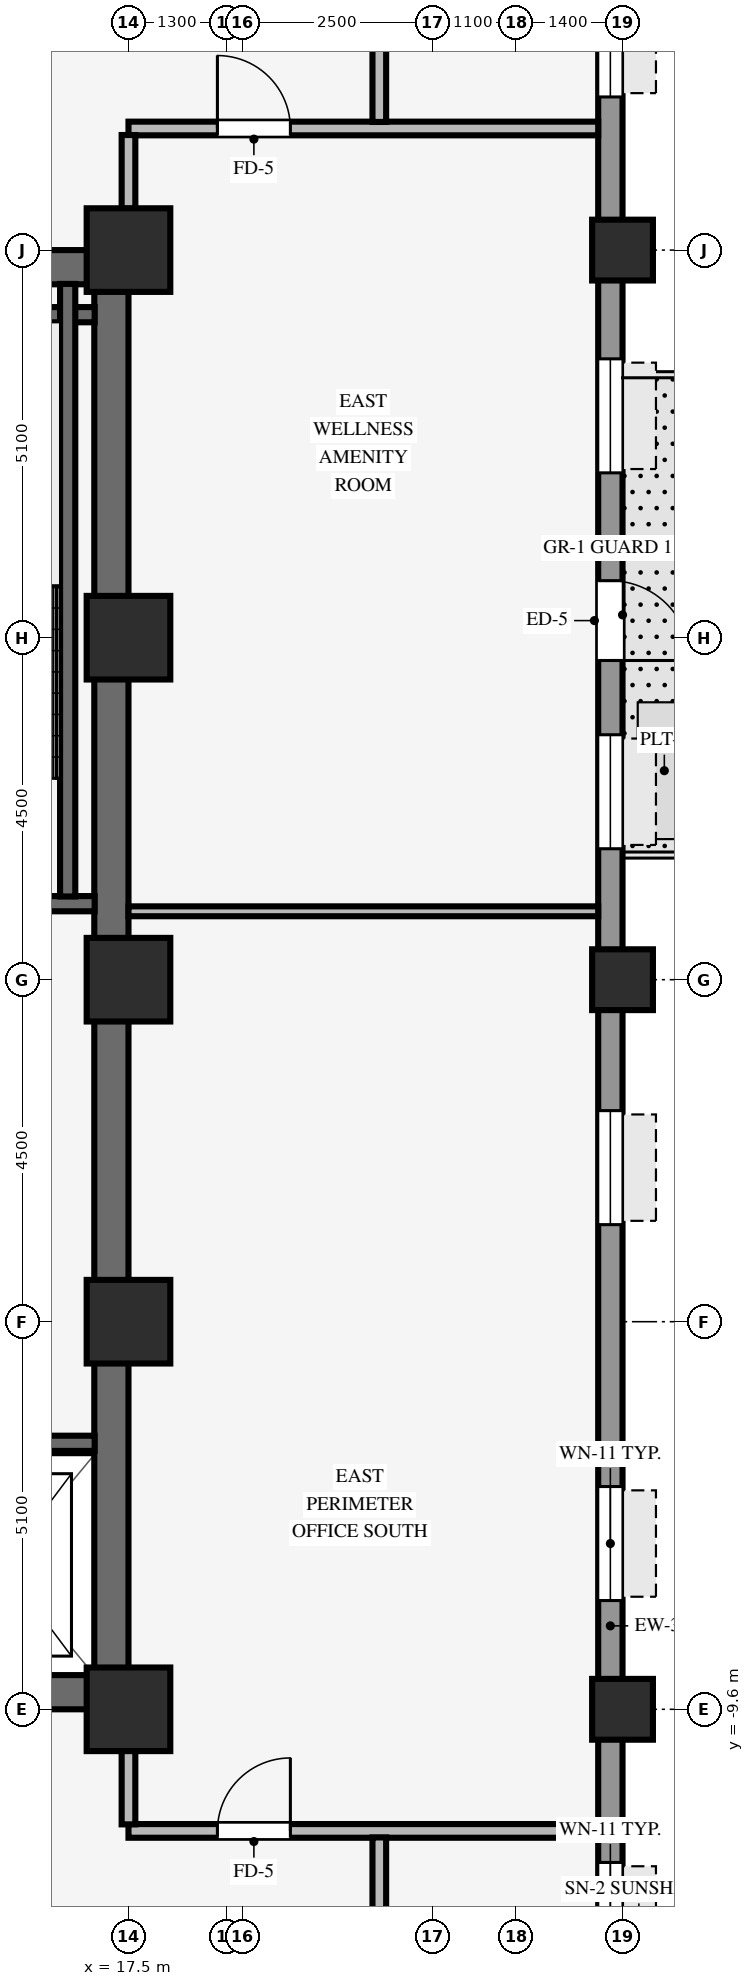
"""IFC4 building model, lengths in metres.
Left out: names, types, materials, properties, quantities, classifications, styles, units other than length and angle.
Written with IfcOpenShell. Run it as: python <this file> out.ifc"""

import sys

from ifc_helpers import new_model, si_unit, direction, frame, frame_2d, origin, origin_2d, place, context, subcontext, project, spatial, rectangle, hollow_rectangle, extrude, source, transform, mapped, element, fill, save


model = new_model("IFC4")
c1 = context("Model", 3, precision=1e-05, world=origin(), true_north=direction((0.0, 1.0)))
c2 = subcontext(c1, "Body", "Model", "MODEL_VIEW")
j1 = project(units=[si_unit("LENGTHUNIT", "METRE"), si_unit("PLANEANGLEUNIT", "RADIAN")], contexts=[c1])
p1 = place(None, origin())
s1 = spatial("IfcSite", under=j1, at=p1, CompositionType="ELEMENT")
p2 = place(p1, origin())
s2 = spatial("IfcBuilding", under=s1, at=p2, CompositionType="ELEMENT")
p3 = place(p2, frame((0.0, 0.0, 86.0)))
s3 = spatial("IfcBuildingStorey", under=s2, at=p3, CompositionType="ELEMENT", Elevation=86.0)
for number, where, z_axis, x_axis in (
    (1, (9.0, -9.375, 0.0), (0.0, 0.0, 1.0), (1.0, 0.0, 0.0)),
    (2, (9.0, 9.375, 0.0), (0.0, 0.0, 1.0), (1.0, 0.0, 0.0)),
):
    element("IfcWall", number, at=place(p3, frame(where, z_axis=z_axis, x_axis=x_axis)), inside=s3, PredefinedType="SHEAR", context=c2, shape_type="SweptSolid", body=[
        extrude(rectangle(XDim=8.5, YDim=0.45, at=frame_2d((4.25, 0.0))), origin(), (0.0, 0.0, 1.0), 3.37),
    ])
p4 = place(p3, frame((17.275, -9.155, 0.0), z_axis=(0.0, 0.0, 1.0), x_axis=(0.0, 1.0, 0.0)))
e3 = element("IfcWall", 3, at=p4, inside=s3, PredefinedType="SHEAR", context=c2, shape_type="SweptSolid", body=[
    extrude(rectangle(XDim=18.31, YDim=0.45, at=frame_2d((9.155, 0.0))), origin(), (0.0, 0.0, 1.0), 3.37),
])
for number, where, z_axis, x_axis in (
    (4, (17.5, -9.6, 0.0), (0.0, 0.0, 1.0), (1.0, 0.0, 0.0)),
    (5, (17.5, -4.5, 0.0), (0.0, 0.0, 1.0), (1.0, 0.0, 0.0)),
    (6, (17.5, 4.5, 0.0), (0.0, 0.0, 1.0), (1.0, 0.0, 0.0)),
    (7, (17.5, 9.6, 0.0), (0.0, 0.0, 1.0), (1.0, 0.0, 0.0)),
    (8, (17.5, 0.0, 0.0), (0.0, 0.0, 1.0), (1.0, 0.0, 0.0)),
):
    element("IfcColumn", number, at=place(p3, frame(where, z_axis=z_axis, x_axis=x_axis)), inside=s3, PredefinedType="COLUMN", context=c2, shape_type="SweptSolid", body=[
        extrude(rectangle(XDim=1.1, YDim=1.1, at=origin_2d()), origin(), (0.0, 0.0, 1.0), 3.37),
    ])
for number, where, z_axis, x_axis in (
    (9, (24.0, -9.6, -0.4), (0.0, 0.0, 1.0), (1.0, 0.0, 0.0)),
    (10, (24.0, 0.0, -0.4), (0.0, 0.0, 1.0), (1.0, 0.0, 0.0)),
    (11, (24.0, 9.6, -0.4), (0.0, 0.0, 1.0), (1.0, 0.0, 0.0)),
):
    element("IfcColumn", number, at=place(p3, frame(where, z_axis=z_axis, x_axis=x_axis)), inside=s3, PredefinedType="COLUMN", context=c2, shape_type="SweptSolid", body=[
        extrude(hollow_rectangle(XDim=0.8, YDim=0.8, WallThickness=0.055, InnerFilletRadius=0.055, OuterFilletRadius=0.11, at=origin_2d()), origin(), (0.0, 0.0, 1.0), 3.77),
    ])
p5 = place(p3, frame((23.84, -20.784, 0.0), z_axis=(0.0, 0.0, 1.0), x_axis=(0.0, 1.0, 0.0)))
e12 = element("IfcWall", 12, at=p5, inside=s3, PredefinedType="STANDARD", context=c2, shape_type="SweptSolid", body=[
    extrude(rectangle(XDim=41.568, YDim=0.32, at=frame_2d((20.784, 0.0))), origin(), (0.0, 0.0, 1.0), 2.705),
])
p6 = place(p5, frame((26.034, 0.0, 0.0), z_axis=(0.0, 0.0, 1.0), x_axis=(-1.0, 0.0, 0.0)))
e13 = element("IfcOpeningElement", 13, at=p6, cuts=e12, PredefinedType="OPENING", context=c2, shape_type="SweptSolid", body=[
    extrude(rectangle(XDim=1.05, YDim=2.1, at=frame_2d((0.525, 1.05))), frame((0.0, 0.17, 0.0), z_axis=(0.0, -1.0, 0.0), x_axis=(1.0, 0.0, 0.0)), (0.0, 0.0, 1.0), 0.34),
])
p7 = place(p5, frame((1.373, 0.0, 0.8)))
e14 = element("IfcOpeningElement", 14, at=p7, cuts=e12, PredefinedType="OPENING", context=c2, shape_type="SweptSolid", body=[
    extrude(rectangle(XDim=1.5, YDim=1.6, at=frame_2d((0.75, 0.8))), frame((0.0, 0.17, 0.0), z_axis=(0.0, -1.0, 0.0), x_axis=(1.0, 0.0, 0.0)), (0.0, 0.0, 1.0), 0.34),
])
p8 = place(p5, frame((7.669, 0.0, 0.8)))
e15 = element("IfcOpeningElement", 15, at=p8, cuts=e12, PredefinedType="OPENING", context=c2, shape_type="SweptSolid", body=[
    extrude(rectangle(XDim=1.5, YDim=1.6, at=frame_2d((0.75, 0.8))), frame((0.0, 0.17, 0.0), z_axis=(0.0, -1.0, 0.0), x_axis=(1.0, 0.0, 0.0)), (0.0, 0.0, 1.0), 0.34),
])
p9 = place(p5, frame((12.615, 0.0, 0.8)))
e16 = element("IfcOpeningElement", 16, at=p9, cuts=e12, PredefinedType="OPENING", context=c2, shape_type="SweptSolid", body=[
    extrude(rectangle(XDim=1.5, YDim=1.6, at=frame_2d((0.75, 0.8))), frame((0.0, 0.17, 0.0), z_axis=(0.0, -1.0, 0.0), x_axis=(1.0, 0.0, 0.0)), (0.0, 0.0, 1.0), 0.34),
])
p10 = place(p5, frame((17.561, 0.0, 0.8)))
e17 = element("IfcOpeningElement", 17, at=p10, cuts=e12, PredefinedType="OPENING", context=c2, shape_type="SweptSolid", body=[
    extrude(rectangle(XDim=1.5, YDim=1.6, at=frame_2d((0.75, 0.8))), frame((0.0, 0.17, 0.0), z_axis=(0.0, -1.0, 0.0), x_axis=(1.0, 0.0, 0.0)), (0.0, 0.0, 1.0), 0.34),
])
p11 = place(p5, frame((22.507, 0.0, 0.8)))
e18 = element("IfcOpeningElement", 18, at=p11, cuts=e12, PredefinedType="OPENING", context=c2, shape_type="SweptSolid", body=[
    extrude(rectangle(XDim=1.5, YDim=1.6, at=frame_2d((0.75, 0.8))), frame((0.0, 0.17, 0.0), z_axis=(0.0, -1.0, 0.0), x_axis=(1.0, 0.0, 0.0)), (0.0, 0.0, 1.0), 0.34),
])
p12 = place(p5, frame((27.453, 0.0, 0.8)))
e19 = element("IfcOpeningElement", 19, at=p12, cuts=e12, PredefinedType="OPENING", context=c2, shape_type="SweptSolid", body=[
    extrude(rectangle(XDim=1.5, YDim=1.6, at=frame_2d((0.75, 0.8))), frame((0.0, 0.17, 0.0), z_axis=(0.0, -1.0, 0.0), x_axis=(1.0, 0.0, 0.0)), (0.0, 0.0, 1.0), 0.34),
])
p13 = place(p5, frame((32.399, 0.0, 0.8)))
e20 = element("IfcOpeningElement", 20, at=p13, cuts=e12, PredefinedType="OPENING", context=c2, shape_type="SweptSolid", body=[
    extrude(rectangle(XDim=1.5, YDim=1.6, at=frame_2d((0.75, 0.8))), frame((0.0, 0.17, 0.0), z_axis=(0.0, -1.0, 0.0), x_axis=(1.0, 0.0, 0.0)), (0.0, 0.0, 1.0), 0.34),
])
p14 = place(p5, frame((38.695, 0.0, 0.8)))
e21 = element("IfcOpeningElement", 21, at=p14, cuts=e12, PredefinedType="OPENING", context=c2, shape_type="SweptSolid", body=[
    extrude(rectangle(XDim=1.5, YDim=1.6, at=frame_2d((0.75, 0.8))), frame((0.0, 0.17, 0.0), z_axis=(0.0, -1.0, 0.0), x_axis=(1.0, 0.0, 0.0)), (0.0, 0.0, 1.0), 0.34),
])
for number, where, z_axis, x_axis in (
    (22, (13.535, 1.0, 0.0), (0.0, 0.0, 1.0), (1.0, 0.0, 0.0)),
    (23, (13.535, 8.75, 0.0), (0.0, 0.0, 1.0), (1.0, 0.0, 0.0)),
):
    element("IfcWall", number, at=place(p3, frame(where, z_axis=z_axis, x_axis=x_axis)), inside=s3, PredefinedType="SHEAR", context=c2, shape_type="SweptSolid", body=[
        extrude(rectangle(XDim=3.52, YDim=0.2, at=frame_2d((1.76, 0.0))), origin(), (0.0, 0.0, 1.0), 3.37),
    ])
p15 = place(p3, frame((16.7, 1.095, 0.0), z_axis=(0.0, 0.0, 1.0), x_axis=(0.0, 1.0, 0.0)))
e24 = element("IfcWall", 24, at=p15, inside=s3, PredefinedType="SHEAR", context=c2, shape_type="SweptSolid", body=[
    extrude(rectangle(XDim=8.06, YDim=0.2, at=frame_2d((4.03, 0.0))), origin(), (0.0, 0.0, 1.0), 3.37),
])
p16 = place(p3, frame((14.645, -6.1, 0.0), z_axis=(0.0, 0.0, 1.0), x_axis=(1.0, 0.0, 0.0)))
e25 = element("IfcWall", 25, at=p16, inside=s3, PredefinedType="SHEAR", context=c2, shape_type="SweptSolid", body=[
    extrude(rectangle(XDim=2.41, YDim=0.2, at=frame_2d((1.205, 0.0))), origin(), (0.0, 0.0, 1.0), 3.37),
])
p17 = place(p3, frame((17.5, -11.2, 0.0), z_axis=(0.0, 0.0, 1.0), x_axis=(1.0, 0.0, 0.0)))
e26 = element("IfcWall", 26, at=p17, inside=s3, PredefinedType="PARTITIONING", context=c2, shape_type="SweptSolid", body=[
    extrude(rectangle(XDim=6.18, YDim=0.18, at=frame_2d((3.09, 0.0))), origin(), (0.0, 0.0, 1.0), 3.36),
])
p18 = place(p17, frame((1.17, 0.0, 0.0)))
e27 = element("IfcOpeningElement", 27, at=p18, cuts=e26, PredefinedType="OPENING", context=c2, shape_type="SweptSolid", body=[
    extrude(rectangle(XDim=0.96, YDim=2.1, at=frame_2d((0.48, 1.05))), frame((0.0, 0.1, 0.0), z_axis=(0.0, -1.0, 0.0), x_axis=(1.0, 0.0, 0.0)), (0.0, 0.0, 1.0), 0.2),
])
p19 = place(p3, frame((17.5, 0.9, 0.0), z_axis=(0.0, 0.0, 1.0), x_axis=(1.0, 0.0, 0.0)))
e28 = element("IfcWall", 28, at=p19, inside=s3, PredefinedType="PARTITIONING", context=c2, shape_type="SweptSolid", body=[
    extrude(rectangle(XDim=6.18, YDim=0.13, at=frame_2d((3.09, 0.0))), origin(), (0.0, 0.0, 1.0), 3.36),
])
p20 = place(p3, frame((17.5, 11.2, 0.0), z_axis=(0.0, 0.0, 1.0), x_axis=(1.0, 0.0, 0.0)))
e29 = element("IfcWall", 29, at=p20, inside=s3, PredefinedType="PARTITIONING", context=c2, shape_type="SweptSolid", body=[
    extrude(rectangle(XDim=6.18, YDim=0.18, at=frame_2d((3.09, 0.0))), origin(), (0.0, 0.0, 1.0), 3.36),
])
p21 = place(p20, frame((1.17, 0.0, 0.0)))
e30 = element("IfcOpeningElement", 30, at=p21, cuts=e29, PredefinedType="OPENING", context=c2, shape_type="SweptSolid", body=[
    extrude(rectangle(XDim=0.96, YDim=2.1, at=frame_2d((0.48, 1.05))), frame((0.0, 0.1, 0.0), z_axis=(0.0, -1.0, 0.0), x_axis=(1.0, 0.0, 0.0)), (0.0, 0.0, 1.0), 0.2),
])
for number, where, z_axis, x_axis in (
    (31, (17.5, -11.114, 0.0), (0.0, 0.0, 1.0), (0.0, 1.0, 0.0)),
    (32, (17.5, 10.146, 0.0), (0.0, 0.0, 1.0), (0.0, 1.0, 0.0)),
):
    element("IfcWall", number, at=place(p3, frame(where, z_axis=z_axis, x_axis=x_axis)), inside=s3, PredefinedType="PARTITIONING", context=c2, shape_type="SweptSolid", body=[
        extrude(rectangle(XDim=0.968, YDim=0.18, at=frame_2d((0.484, 0.0))), origin(), (0.0, 0.0, 1.0), 2.738),
    ])
for number, where, z_axis, x_axis in (
    (33, (20.8, -13.514, 0.0), (0.0, 0.0, 1.0), (0.0, 1.0, 0.0)),
    (34, (20.8, 11.286, 0.0), (0.0, 0.0, 1.0), (0.0, 1.0, 0.0)),
):
    element("IfcWall", number, at=place(p3, frame(where, z_axis=z_axis, x_axis=x_axis)), inside=s3, PredefinedType="PARTITIONING", context=c2, shape_type="SweptSolid", body=[
        extrude(rectangle(XDim=2.228, YDim=0.18, at=frame_2d((1.114, 0.0))), origin(), (0.0, 0.0, 1.0), 3.36),
    ])
m1 = source(origin(), c2, "Body", "SweptSolid", [
    extrude(rectangle(XDim=1.05, YDim=2.1, at=frame_2d((0.525, 1.05))), frame((0.0, 0.025, 0.0), z_axis=(0.0, -1.0, 0.0), x_axis=(1.0, 0.0, 0.0)), (0.0, 0.0, 1.0), 0.05),
])
p22 = place(p6, origin())
e35 = element("IfcDoor", 35, at=p22, inside=s3, OperationType="SINGLE_SWING_RIGHT", PredefinedType="DOOR", context=c2, shape_type="MappedRepresentation", body=[
    mapped(m1, transform((0.0, 0.0, 0.0), scale=1.0)),
])
fill(e13, e35)
m2 = source(origin(), c2, "Body", "SweptSolid", [
    extrude(rectangle(XDim=1.5, YDim=1.6, at=frame_2d((0.75, 0.8))), frame((0.0, 0.03, 0.0), z_axis=(0.0, -1.0, 0.0), x_axis=(1.0, 0.0, 0.0)), (0.0, 0.0, 1.0), 0.06),
])
p23 = place(p8, origin())
e36 = element("IfcWindow", 36, at=p23, inside=s3, PartitioningType="SINGLE_PANEL", PredefinedType="WINDOW", context=c2, shape_type="MappedRepresentation", body=[
    mapped(m2, transform((0.0, 0.0, 0.0), scale=1.0)),
])
fill(e15, e36)
p24 = place(p9, origin())
e37 = element("IfcWindow", 37, at=p24, inside=s3, PartitioningType="SINGLE_PANEL", PredefinedType="WINDOW", context=c2, shape_type="MappedRepresentation", body=[
    mapped(m2, transform((0.0, 0.0, 0.0), scale=1.0)),
])
fill(e16, e37)
p25 = place(p10, origin())
e38 = element("IfcWindow", 38, at=p25, inside=s3, PartitioningType="SINGLE_PANEL", PredefinedType="WINDOW", context=c2, shape_type="MappedRepresentation", body=[
    mapped(m2, transform((0.0, 0.0, 0.0), scale=1.0)),
])
fill(e17, e38)
p26 = place(p11, origin())
e39 = element("IfcWindow", 39, at=p26, inside=s3, PartitioningType="SINGLE_PANEL", PredefinedType="WINDOW", context=c2, shape_type="MappedRepresentation", body=[
    mapped(m2, transform((0.0, 0.0, 0.0), scale=1.0)),
])
fill(e18, e39)
p27 = place(p12, origin())
e40 = element("IfcWindow", 40, at=p27, inside=s3, PartitioningType="SINGLE_PANEL", PredefinedType="WINDOW", context=c2, shape_type="MappedRepresentation", body=[
    mapped(m2, transform((0.0, 0.0, 0.0), scale=1.0)),
])
fill(e19, e40)
p28 = place(p13, origin())
e41 = element("IfcWindow", 41, at=p28, inside=s3, PartitioningType="SINGLE_PANEL", PredefinedType="WINDOW", context=c2, shape_type="MappedRepresentation", body=[
    mapped(m2, transform((0.0, 0.0, 0.0), scale=1.0)),
])
fill(e20, e41)
m3 = source(origin(), c2, "Body", "SweptSolid", [
    extrude(rectangle(XDim=0.96, YDim=2.1, at=frame_2d((0.48, 1.05))), frame((0.0, 0.025, 0.0), z_axis=(0.0, -1.0, 0.0), x_axis=(1.0, 0.0, 0.0)), (0.0, 0.0, 1.0), 0.05),
])
p29 = place(p18, origin())
e42 = element("IfcDoor", 42, at=p29, inside=s3, OperationType="SINGLE_SWING_RIGHT", PredefinedType="DOOR", context=c2, shape_type="MappedRepresentation", body=[
    mapped(m3, transform((0.0, 0.0, 0.0), scale=1.0)),
])
fill(e27, e42)
p30 = place(p21, origin())
e43 = element("IfcDoor", 43, at=p30, inside=s3, OperationType="SINGLE_SWING_LEFT", PredefinedType="DOOR", context=c2, shape_type="MappedRepresentation", body=[
    mapped(m3, transform((0.0, 0.0, 0.0), scale=1.0)),
])
fill(e30, e43)
save(model, sys.argv[1])
